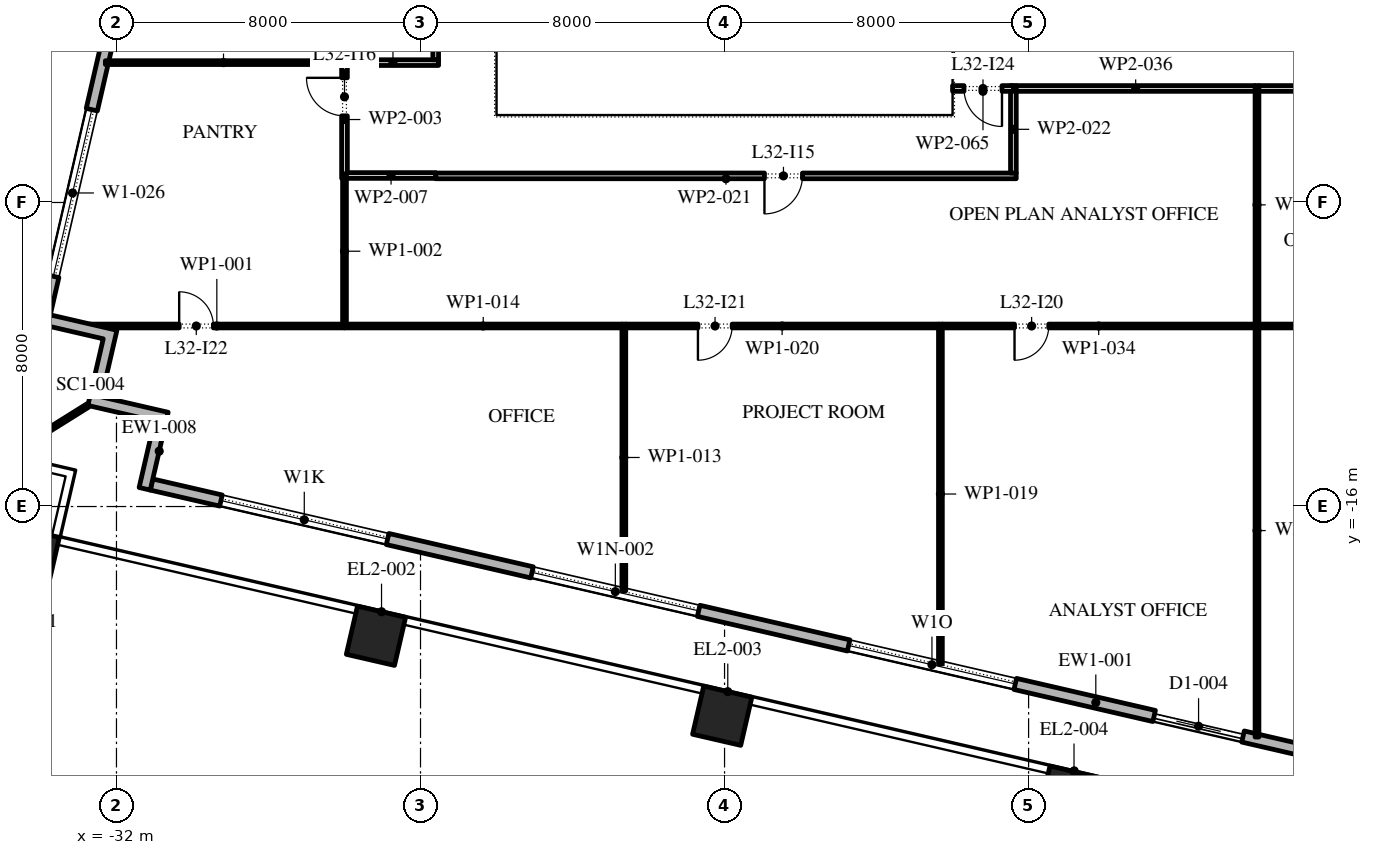
"""IFC4 building model, lengths in metres.
Left out: names, types, materials, properties, quantities, classifications, styles, units other than length and angle.
Written with IfcOpenShell. Run it as: python <this file> out.ifc"""

import sys

from ifc_helpers import new_model, si_unit, direction, frame, frame_2d, origin, origin_2d, place, context, subcontext, project, spatial, polyline, rectangle, outline, extrude, element, fill, save


model = new_model("IFC4")
c1 = context("Model", 3, precision=1e-05, world=origin(), true_north=direction((0.0, 1.0)))
c2 = subcontext(c1, "Body", "Model", "MODEL_VIEW")
j1 = project(units=[si_unit("LENGTHUNIT", "METRE"), si_unit("PLANEANGLEUNIT", "RADIAN")], contexts=[c1])
p1 = place(None, origin())
s1 = spatial("IfcSite", under=j1, at=p1, CompositionType="ELEMENT")
p2 = place(p1, origin())
s2 = spatial("IfcBuilding", under=s1, at=p2, CompositionType="ELEMENT")
p3 = place(p2, frame((0.0, 0.0, 147.6)))
s3 = spatial("IfcBuildingStorey", under=s2, at=p3, CompositionType="ELEMENT", Elevation=147.6)
for number, where, z_axis, x_axis in (
    (1, (-34.282, -17.298, 0.0), (0.0, 0.0, 1.0), (0.974, -0.225, 0.0)),
    (2, (-25.172, -19.402, 0.0), (0.0, 0.0, 1.0), (0.974, -0.225, 0.0)),
    (3, (-16.061, -21.505, 0.0), (0.0, 0.0, 1.0), (0.974, -0.225, 0.0)),
    (4, (-6.951, -23.608, 0.0), (0.0, 0.0, 1.0), (0.974, -0.225, 0.0)),
):
    element("IfcColumn", number, at=place(p3, frame(where, z_axis=z_axis, x_axis=x_axis)), inside=s3, PredefinedType="COLUMN", context=c2, shape_type="SweptSolid", body=[
        extrude(rectangle(XDim=1.3, YDim=1.3, at=origin_2d()), origin(), (0.0, 0.0, 1.0), 4.2),
    ])
p4 = place(p3, frame((-31.078, -15.421, 0.0), z_axis=(0.0, 0.0, 1.0), x_axis=(0.974370456532, -0.224949357493, 0.0)))
e5 = element("IfcWall", 5, at=p4, inside=s3, PredefinedType="STANDARD", context=c2, shape_type="SweptSolid", body=[
    extrude(rectangle(XDim=51.0, YDim=0.3, at=frame_2d((25.5, 0.0))), origin(), (0.0, 0.0, 1.0), 4.0),
])
p5 = place(p4, frame((1.875, 0.0, 0.45)))
e6 = element("IfcOpeningElement", 6, at=p5, cuts=e5, PredefinedType="OPENING", context=c2, shape_type="SweptSolid", body=[
    extrude(rectangle(XDim=4.5, YDim=2.65, at=frame_2d((2.25, 1.325))), frame((0.0, 0.16, 0.0), z_axis=(0.0, -1.0, 0.0), x_axis=(1.0, 0.0, 0.0)), (0.0, 0.0, 1.0), 0.32),
])
p6 = place(p4, frame((10.275, 0.0, 0.45)))
e7 = element("IfcOpeningElement", 7, at=p6, cuts=e5, PredefinedType="OPENING", context=c2, shape_type="SweptSolid", body=[
    extrude(rectangle(XDim=4.5, YDim=2.525, at=frame_2d((2.25, 1.262))), frame((0.0, 0.16, 0.0), z_axis=(0.0, -1.0, 0.0), x_axis=(1.0, 0.0, 0.0)), (0.0, 0.0, 1.0), 0.32),
])
p7 = place(p4, frame((18.825, 0.0, 0.45)))
e8 = element("IfcOpeningElement", 8, at=p7, cuts=e5, PredefinedType="OPENING", context=c2, shape_type="SweptSolid", body=[
    extrude(rectangle(XDim=4.5, YDim=2.5, at=frame_2d((2.25, 1.25))), frame((0.0, 0.16, 0.0), z_axis=(0.0, -1.0, 0.0), x_axis=(1.0, 0.0, 0.0)), (0.0, 0.0, 1.0), 0.32),
])
p8 = place(p4, frame((27.075, 0.0, 0.0)))
e9 = element("IfcOpeningElement", 9, at=p8, cuts=e5, PredefinedType="OPENING", context=c2, shape_type="SweptSolid", body=[
    extrude(rectangle(XDim=2.4, YDim=3.5, at=frame_2d((1.2, 1.75))), frame((0.0, 0.16, 0.0), z_axis=(0.0, -1.0, 0.0), x_axis=(1.0, 0.0, 0.0)), (0.0, 0.0, 1.0), 0.32),
])
p9 = place(p4, frame((35.925, 0.0, 0.45)))
e10 = element("IfcOpeningElement", 10, at=p9, cuts=e5, PredefinedType="OPENING", context=c2, shape_type="SweptSolid", body=[
    extrude(rectangle(XDim=4.5, YDim=2.45, at=frame_2d((2.25, 1.225))), frame((0.0, 0.16, 0.0), z_axis=(0.0, -1.0, 0.0), x_axis=(1.0, 0.0, 0.0)), (0.0, 0.0, 1.0), 0.32),
])
p10 = place(p4, frame((44.475, 0.0, 0.45)))
e11 = element("IfcOpeningElement", 11, at=p10, cuts=e5, PredefinedType="OPENING", context=c2, shape_type="SweptSolid", body=[
    extrude(rectangle(XDim=4.5, YDim=2.45, at=frame_2d((2.25, 1.225))), frame((0.0, 0.16, 0.0), z_axis=(0.0, -1.0, 0.0), x_axis=(1.0, 0.0, 0.0)), (0.0, 0.0, 1.0), 0.32),
])
p11 = place(p3, frame((-22.82, 37.016, 0.0), z_axis=(0.0, 0.0, 1.0), x_axis=(-0.224953880882, -0.974369412223, 0.0)))
e12 = element("IfcWall", 12, at=p11, inside=s3, PredefinedType="STANDARD", context=c2, shape_type="SweptSolid", body=[
    extrude(rectangle(XDim=49.5, YDim=0.3, at=frame_2d((24.75, 0.0))), origin(), (0.0, 0.0, 1.0), 4.0),
])
p12 = place(p11, frame((1.157, 0.0, 0.45)))
e13 = element("IfcOpeningElement", 13, at=p12, cuts=e12, PredefinedType="OPENING", context=c2, shape_type="SweptSolid", body=[
    extrude(rectangle(XDim=4.5, YDim=3.05, at=frame_2d((2.25, 1.525))), frame((0.0, 0.16, 0.0), z_axis=(0.0, -1.0, 0.0), x_axis=(1.0, 0.0, 0.0)), (0.0, 0.0, 1.0), 0.32),
])
p13 = place(p11, frame((8.121, 0.0, 0.45)))
e14 = element("IfcOpeningElement", 14, at=p13, cuts=e12, PredefinedType="OPENING", context=c2, shape_type="SweptSolid", body=[
    extrude(rectangle(XDim=4.5, YDim=3.05, at=frame_2d((2.25, 1.525))), frame((0.0, 0.16, 0.0), z_axis=(0.0, -1.0, 0.0), x_axis=(1.0, 0.0, 0.0)), (0.0, 0.0, 1.0), 0.32),
])
p14 = place(p11, frame((15.236, 0.0, 0.45)))
e15 = element("IfcOpeningElement", 15, at=p14, cuts=e12, PredefinedType="OPENING", context=c2, shape_type="SweptSolid", body=[
    extrude(rectangle(XDim=4.5, YDim=3.05, at=frame_2d((2.25, 1.525))), frame((0.0, 0.16, 0.0), z_axis=(0.0, -1.0, 0.0), x_axis=(1.0, 0.0, 0.0)), (0.0, 0.0, 1.0), 0.32),
])
p15 = place(p11, frame((23.4, 0.0, 0.0)))
e16 = element("IfcOpeningElement", 16, at=p15, cuts=e12, PredefinedType="OPENING", context=c2, shape_type="SweptSolid", body=[
    extrude(rectangle(XDim=2.4, YDim=3.5, at=frame_2d((1.2, 1.75))), frame((0.0, 0.16, 0.0), z_axis=(0.0, -1.0, 0.0), x_axis=(1.0, 0.0, 0.0)), (0.0, 0.0, 1.0), 0.32),
])
p16 = place(p11, frame((29.464, 0.0, 0.45)))
e17 = element("IfcOpeningElement", 17, at=p16, cuts=e12, PredefinedType="OPENING", context=c2, shape_type="SweptSolid", body=[
    extrude(rectangle(XDim=4.5, YDim=2.875, at=frame_2d((2.25, 1.438))), frame((0.0, 0.16, 0.0), z_axis=(0.0, -1.0, 0.0), x_axis=(1.0, 0.0, 0.0)), (0.0, 0.0, 1.0), 0.32),
])
p17 = place(p11, frame((36.579, 0.0, 0.45)))
e18 = element("IfcOpeningElement", 18, at=p17, cuts=e12, PredefinedType="OPENING", context=c2, shape_type="SweptSolid", body=[
    extrude(rectangle(XDim=4.5, YDim=2.675, at=frame_2d((2.25, 1.337))), frame((0.0, 0.16, 0.0), z_axis=(0.0, -1.0, 0.0), x_axis=(1.0, 0.0, 0.0)), (0.0, 0.0, 1.0), 0.32),
])
p18 = place(p11, frame((43.693, 0.0, 0.45)))
e19 = element("IfcOpeningElement", 19, at=p18, cuts=e12, PredefinedType="OPENING", context=c2, shape_type="SweptSolid", body=[
    extrude(rectangle(XDim=4.5, YDim=3.05, at=frame_2d((2.25, 1.525))), frame((0.0, 0.16, 0.0), z_axis=(0.0, -1.0, 0.0), x_axis=(1.0, 0.0, 0.0)), (0.0, 0.0, 1.0), 0.32),
])
p19 = place(p3, origin())
e20 = element("IfcWall", 20, at=p19, inside=s3, PredefinedType="STANDARD", context=c2, shape_type="SweptSolid", body=[
    extrude(outline(polyline([(-32.393, -13.116), (-30.639, -13.521), (-31.111, -15.567), (-31.404, -15.5), (-30.999, -13.746), (-32.753, -13.341), (-32.348, -11.587), (-33.809, -11.25), (-33.742, -10.957), (-31.988, -11.362), (-32.393, -13.116)])), origin(), (0.0, 0.0, 1.0), 4.0),
])
p20 = place(p3, frame((-32.753, -13.341, -0.05), z_axis=(0.0, 0.0, 1.0), x_axis=(-0.848059759764, -0.529900598103, 0.0)))
e21 = element("IfcWall", 21, at=p20, inside=s3, PredefinedType="STANDARD", context=c2, shape_type="SweptSolid", body=[
    extrude(rectangle(XDim=2.455, YDim=0.1, at=frame_2d((1.228, 0.0))), origin(), (0.0, 0.0, 1.0), 4.05),
])
p21 = place(p3, frame((-26.0, -11.25, 0.0), z_axis=(0.0, 0.0, 1.0), x_axis=(-1.0, 0.0, 0.0)))
e22 = element("IfcWall", 22, at=p21, inside=s3, PredefinedType="PARTITIONING", context=c2, shape_type="SweptSolid", body=[
    extrude(rectangle(XDim=6.718, YDim=0.1, at=frame_2d((3.359, 0.0))), origin(), (0.0, 0.0, 1.0), 4.0),
])
p22 = place(p21, frame((3.45, 0.0, 0.0)))
e23 = element("IfcOpeningElement", 23, at=p22, cuts=e22, PredefinedType="OPENING", context=c2, shape_type="SweptSolid", body=[
    extrude(rectangle(XDim=0.9, YDim=2.1, at=frame_2d((0.45, 1.05))), frame((0.0, 0.06, 0.0), z_axis=(0.0, -1.0, 0.0), x_axis=(1.0, 0.0, 0.0)), (0.0, 0.0, 1.0), 0.12),
])
p23 = place(p3, frame((-26.0, -11.2, 0.0), z_axis=(0.0, 0.0, 1.0), x_axis=(0.0, 1.0, 0.0)))
e24 = element("IfcWall", 24, at=p23, inside=s3, PredefinedType="PARTITIONING", context=c2, shape_type="SweptSolid", body=[
    extrude(rectangle(XDim=3.835, YDim=0.1, at=frame_2d((1.917, 0.0))), origin(), (0.0, 0.0, 1.0), 4.0),
])
p24 = place(p3, frame((-26.0, -7.365, 0.0), z_axis=(0.0, 0.0, 1.0), x_axis=(0.0, 1.0, 0.0)))
e25 = element("IfcWall", 25, at=p24, inside=s3, PredefinedType="PARTITIONING", context=c2, shape_type="SweptSolid", body=[
    extrude(rectangle(XDim=3.095, YDim=0.15, at=frame_2d((1.547, 0.0))), origin(), (0.0, 0.0, 1.0), 4.0),
])
p25 = place(p24, frame((1.645, 0.0, 0.0)))
e26 = element("IfcOpeningElement", 26, at=p25, cuts=e25, PredefinedType="OPENING", context=c2, shape_type="SweptSolid", body=[
    extrude(rectangle(XDim=1.0, YDim=2.1, at=frame_2d((0.5, 1.05))), frame((0.0, 0.085, 0.0), z_axis=(0.0, -1.0, 0.0), x_axis=(1.0, 0.0, 0.0)), (0.0, 0.0, 1.0), 0.17),
])
p26 = place(p3, frame((-26.075, -4.32, 0.0), z_axis=(0.0, 0.0, 1.0), x_axis=(-1.0, 0.0, 0.0)))
e27 = element("IfcWall", 27, at=p26, inside=s3, PredefinedType="PARTITIONING", context=c2, shape_type="SweptSolid", body=[
    extrude(rectangle(XDim=6.217, YDim=0.1, at=frame_2d((3.108, 0.0))), origin(), (0.0, 0.0, 1.0), 4.0),
])
p27 = place(p3, frame((-25.925, -4.32, 0.0), z_axis=(0.0, 0.0, 1.0), x_axis=(1.0, 0.0, 0.0)))
e28 = element("IfcWall", 28, at=p27, inside=s3, PredefinedType="PARTITIONING", context=c2, shape_type="SweptSolid", body=[
    extrude(rectangle(XDim=2.4, YDim=0.15, at=frame_2d((1.2, 0.0))), origin(), (0.0, 0.0, 1.0), 4.0),
])
p28 = place(p3, frame((-23.6, -7.29, 0.0), z_axis=(0.0, 0.0, 1.0), x_axis=(-1.0, 0.0, 0.0)))
e29 = element("IfcWall", 29, at=p28, inside=s3, PredefinedType="PARTITIONING", context=c2, shape_type="SweptSolid", body=[
    extrude(rectangle(XDim=2.35, YDim=0.15, at=frame_2d((1.175, 0.0))), origin(), (0.0, 0.0, 1.0), 4.0),
])
p29 = place(p3, frame((-23.6, -4.245, 0.0), z_axis=(0.0, 0.0, 1.0), x_axis=(0.0, 1.0, 0.0)))
e30 = element("IfcWall", 30, at=p29, inside=s3, PredefinedType="PARTITIONING", context=c2, shape_type="SweptSolid", body=[
    extrude(rectangle(XDim=14.685, YDim=0.15, at=frame_2d((7.343, 0.0))), origin(), (0.0, 0.0, 1.0), 4.0),
])
p30 = place(p29, frame((3.735, 0.0, 0.0)))
e31 = element("IfcOpeningElement", 31, at=p30, cuts=e30, PredefinedType="OPENING", context=c2, shape_type="SweptSolid", body=[
    extrude(rectangle(XDim=1.0, YDim=2.1, at=frame_2d((0.5, 1.05))), frame((0.0, 0.085, 0.0), z_axis=(0.0, -1.0, 0.0), x_axis=(1.0, 0.0, 0.0)), (0.0, 0.0, 1.0), 0.17),
])
p31 = place(p3, frame((-18.65, -18.219, 0.0), z_axis=(0.0, 0.0, 1.0), x_axis=(0.0, 1.0, 0.0)))
e32 = element("IfcWall", 32, at=p31, inside=s3, PredefinedType="PARTITIONING", context=c2, shape_type="SweptSolid", body=[
    extrude(rectangle(XDim=7.019, YDim=0.1, at=frame_2d((3.51, 0.0))), origin(), (0.0, 0.0, 1.0), 4.0),
])
p32 = place(p3, frame((-18.7, -11.25, 0.0), z_axis=(0.0, 0.0, 1.0), x_axis=(-1.0, 0.0, 0.0)))
e33 = element("IfcWall", 33, at=p32, inside=s3, PredefinedType="PARTITIONING", context=c2, shape_type="SweptSolid", body=[
    extrude(rectangle(XDim=7.3, YDim=0.1, at=frame_2d((3.65, 0.0))), origin(), (0.0, 0.0, 1.0), 4.0),
])
p33 = place(p3, frame((-10.32, -20.142, 0.0), z_axis=(0.0, 0.0, 1.0), x_axis=(0.0, 1.0, 0.0)))
e34 = element("IfcWall", 34, at=p33, inside=s3, PredefinedType="PARTITIONING", context=c2, shape_type="SweptSolid", body=[
    extrude(rectangle(XDim=8.942, YDim=0.1, at=frame_2d((4.471, 0.0))), origin(), (0.0, 0.0, 1.0), 4.0),
])
p34 = place(p3, frame((-10.37, -11.25, 0.0), z_axis=(0.0, 0.0, 1.0), x_axis=(-1.0, 0.0, 0.0)))
e35 = element("IfcWall", 35, at=p34, inside=s3, PredefinedType="PARTITIONING", context=c2, shape_type="SweptSolid", body=[
    extrude(rectangle(XDim=8.23, YDim=0.1, at=frame_2d((4.115, 0.0))), origin(), (0.0, 0.0, 1.0), 4.0),
])
p35 = place(p34, frame((5.43, 0.0, 0.0)))
e36 = element("IfcOpeningElement", 36, at=p35, cuts=e35, PredefinedType="OPENING", context=c2, shape_type="SweptSolid", body=[
    extrude(rectangle(XDim=0.9, YDim=2.1, at=frame_2d((0.45, 1.05))), frame((0.0, 0.06, 0.0), z_axis=(0.0, -1.0, 0.0), x_axis=(1.0, 0.0, 0.0)), (0.0, 0.0, 1.0), 0.12),
])
p36 = place(p3, frame((-8.325, -7.3, 0.0), z_axis=(0.0, 0.0, 1.0), x_axis=(-1.0, 0.0, 0.0)))
e37 = element("IfcWall", 37, at=p36, inside=s3, PredefinedType="PARTITIONING", context=c2, shape_type="SweptSolid", body=[
    extrude(rectangle(XDim=15.275, YDim=0.15, at=frame_2d((7.638, 0.0))), origin(), (0.0, 0.0, 1.0), 4.0),
])
p37 = place(p36, frame((5.625, 0.0, 0.0)))
e38 = element("IfcOpeningElement", 38, at=p37, cuts=e37, PredefinedType="OPENING", context=c2, shape_type="SweptSolid", body=[
    extrude(rectangle(XDim=1.0, YDim=2.1, at=frame_2d((0.5, 1.05))), frame((0.0, 0.085, 0.0), z_axis=(0.0, -1.0, 0.0), x_axis=(1.0, 0.0, 0.0)), (0.0, 0.0, 1.0), 0.17),
])
p38 = place(p3, frame((-8.4, -4.925, 0.0), z_axis=(0.0, 0.0, 1.0), x_axis=(0.0, -1.0, 0.0)))
e39 = element("IfcWall", 39, at=p38, inside=s3, PredefinedType="PARTITIONING", context=c2, shape_type="SweptSolid", body=[
    extrude(rectangle(XDim=2.3, YDim=0.15, at=frame_2d((1.15, 0.0))), origin(), (0.0, 0.0, 1.0), 4.0),
])
p39 = place(p3, frame((-1.99, -22.065, 0.0), z_axis=(0.0, 0.0, 1.0), x_axis=(0.0, 1.0, 0.0)))
e40 = element("IfcWall", 40, at=p39, inside=s3, PredefinedType="PARTITIONING", context=c2, shape_type="SweptSolid", body=[
    extrude(rectangle(XDim=10.865, YDim=0.1, at=frame_2d((5.433, 0.0))), origin(), (0.0, 0.0, 1.0), 3.02),
])
p40 = place(p3, frame((-2.04, -11.25, 0.0), z_axis=(0.0, 0.0, 1.0), x_axis=(-1.0, 0.0, 0.0)))
e41 = element("IfcWall", 41, at=p40, inside=s3, PredefinedType="PARTITIONING", context=c2, shape_type="SweptSolid", body=[
    extrude(rectangle(XDim=8.23, YDim=0.1, at=frame_2d((4.115, 0.0))), origin(), (0.0, 0.0, 1.0), 4.0),
])
p41 = place(p40, frame((5.43, 0.0, 0.0)))
e42 = element("IfcOpeningElement", 42, at=p41, cuts=e41, PredefinedType="OPENING", context=c2, shape_type="SweptSolid", body=[
    extrude(rectangle(XDim=0.9, YDim=2.1, at=frame_2d((0.45, 1.05))), frame((0.0, 0.06, 0.0), z_axis=(0.0, -1.0, 0.0), x_axis=(1.0, 0.0, 0.0)), (0.0, 0.0, 1.0), 0.12),
])
p42 = place(p3, frame((-1.99, -11.2, 0.0), z_axis=(0.0, 0.0, 1.0), x_axis=(0.0, 1.0, 0.0)))
e43 = element("IfcWall", 43, at=p42, inside=s3, PredefinedType="PARTITIONING", context=c2, shape_type="SweptSolid", body=[
    extrude(rectangle(XDim=6.275, YDim=0.1, at=frame_2d((3.137, 0.0))), origin(), (0.0, 0.0, 1.0), 3.02),
])
p43 = place(p3, frame((-2.04, -5.0, 0.0), z_axis=(0.0, 0.0, 1.0), x_axis=(-1.0, 0.0, 0.0)))
e44 = element("IfcWall", 44, at=p43, inside=s3, PredefinedType="PARTITIONING", context=c2, shape_type="SweptSolid", body=[
    extrude(rectangle(XDim=6.285, YDim=0.15, at=frame_2d((3.143, 0.0))), origin(), (0.0, 0.0, 1.0), 4.0),
])
p44 = place(p3, frame((8.325, -5.0, 0.0), z_axis=(0.0, 0.0, 1.0), x_axis=(-1.0, 0.0, 0.0)))
e45 = element("IfcWall", 45, at=p44, inside=s3, PredefinedType="PARTITIONING", context=c2, shape_type="SweptSolid", body=[
    extrude(rectangle(XDim=10.265, YDim=0.15, at=frame_2d((5.132, 0.0))), origin(), (0.0, 0.0, 1.0), 4.0),
])
p45 = place(p44, frame((4.665, 0.0, 0.0)))
e46 = element("IfcOpeningElement", 46, at=p45, cuts=e45, PredefinedType="OPENING", context=c2, shape_type="SweptSolid", body=[
    extrude(rectangle(XDim=1.0, YDim=2.1, at=frame_2d((0.5, 1.05))), frame((0.0, 0.085, 0.0), z_axis=(0.0, -1.0, 0.0), x_axis=(1.0, 0.0, 0.0)), (0.0, 0.0, 1.0), 0.17),
])
p46 = place(p3, frame((10.05, -11.25, 0.0), z_axis=(0.0, 0.0, 1.0), x_axis=(-1.0, 0.0, 0.0)))
e47 = element("IfcWall", 47, at=p46, inside=s3, PredefinedType="PARTITIONING", context=c2, shape_type="SweptSolid", body=[
    extrude(rectangle(XDim=11.99, YDim=0.1, at=frame_2d((5.995, 0.0))), origin(), (0.0, 0.0, 1.0), 4.0),
])
p47 = place(p46, frame((4.44, 0.0, 0.0)))
e48 = element("IfcOpeningElement", 48, at=p47, cuts=e47, PredefinedType="OPENING", context=c2, shape_type="SweptSolid", body=[
    extrude(rectangle(XDim=0.9, YDim=2.1, at=frame_2d((0.45, 1.05))), frame((0.0, 0.06, 0.0), z_axis=(0.0, -1.0, 0.0), x_axis=(1.0, 0.0, 0.0)), (0.0, 0.0, 1.0), 0.12),
])
p48 = place(p3, frame((-8.4, -5.0, 0.0), z_axis=(0.0, 0.0, 1.0), x_axis=(-1.0, 0.0, 0.0)))
e49 = element("IfcWall", 49, at=p48, inside=s3, PredefinedType="PARTITIONING", context=c2, shape_type="SweptSolid", body=[
    extrude(rectangle(XDim=1.6, YDim=0.15, at=frame_2d((0.8, 0.0))), origin(), (0.0, 0.0, 1.0), 4.0),
])
p49 = place(p48, frame((0.3, 0.0, 0.0)))
e50 = element("IfcOpeningElement", 50, at=p49, cuts=e49, PredefinedType="OPENING", context=c2, shape_type="SweptSolid", body=[
    extrude(rectangle(XDim=1.0, YDim=2.1, at=frame_2d((0.5, 1.05))), frame((0.0, 0.085, 0.0), z_axis=(0.0, -1.0, 0.0), x_axis=(1.0, 0.0, 0.0)), (0.0, 0.0, 1.0), 0.17),
])
p50 = place(p5, origin())
e51 = element("IfcWindow", 51, at=p50, inside=s3, PartitioningType="DOUBLE_PANEL_VERTICAL", PredefinedType="WINDOW", context=c2, shape_type="SweptSolid", body=[
    extrude(rectangle(XDim=4.5, YDim=2.65, at=frame_2d((2.25, 1.325))), frame((0.0, 0.03, 0.0), z_axis=(0.0, -1.0, 0.0), x_axis=(1.0, 0.0, 0.0)), (0.0, 0.0, 1.0), 0.06),
])
fill(e6, e51)
p51 = place(p6, origin())
e52 = element("IfcWindow", 52, at=p51, inside=s3, PartitioningType="DOUBLE_PANEL_VERTICAL", PredefinedType="WINDOW", context=c2, shape_type="SweptSolid", body=[
    extrude(rectangle(XDim=4.5, YDim=2.525, at=frame_2d((2.25, 1.262))), frame((0.0, 0.03, 0.0), z_axis=(0.0, -1.0, 0.0), x_axis=(1.0, 0.0, 0.0)), (0.0, 0.0, 1.0), 0.06),
])
fill(e7, e52)
p52 = place(p7, origin())
e53 = element("IfcWindow", 53, at=p52, inside=s3, PartitioningType="DOUBLE_PANEL_VERTICAL", PredefinedType="WINDOW", context=c2, shape_type="SweptSolid", body=[
    extrude(rectangle(XDim=4.5, YDim=2.5, at=frame_2d((2.25, 1.25))), frame((0.0, 0.03, 0.0), z_axis=(0.0, -1.0, 0.0), x_axis=(1.0, 0.0, 0.0)), (0.0, 0.0, 1.0), 0.06),
])
fill(e8, e53)
p53 = place(p8, origin())
e54 = element("IfcDoor", 54, at=p53, inside=s3, OperationType="DOUBLE_DOOR_SLIDING", PredefinedType="DOOR", context=c2, shape_type="SweptSolid", body=[
    extrude(rectangle(XDim=2.4, YDim=3.5, at=frame_2d((1.2, 1.75))), frame((0.0, 0.025, 0.0), z_axis=(0.0, -1.0, 0.0), x_axis=(1.0, 0.0, 0.0)), (0.0, 0.0, 1.0), 0.05),
])
fill(e9, e54)
p54 = place(p18, origin())
e55 = element("IfcWindow", 55, at=p54, inside=s3, PartitioningType="DOUBLE_PANEL_VERTICAL", PredefinedType="WINDOW", context=c2, shape_type="SweptSolid", body=[
    extrude(rectangle(XDim=4.5, YDim=3.05, at=frame_2d((2.25, 1.525))), frame((0.0, 0.03, 0.0), z_axis=(0.0, -1.0, 0.0), x_axis=(1.0, 0.0, 0.0)), (0.0, 0.0, 1.0), 0.06),
])
fill(e19, e55)
p55 = place(p37, origin())
e56 = element("IfcDoor", 56, at=p55, inside=s3, OperationType="SINGLE_SWING_LEFT", PredefinedType="DOOR", context=c2, shape_type="SweptSolid", body=[
    extrude(rectangle(XDim=1.0, YDim=2.1, at=frame_2d((0.5, 1.05))), frame((0.0, 0.025, 0.0), z_axis=(0.0, -1.0, 0.0), x_axis=(1.0, 0.0, 0.0)), (0.0, 0.0, 1.0), 0.05),
])
fill(e38, e56)
p56 = place(p25, origin())
e57 = element("IfcDoor", 57, at=p56, inside=s3, OperationType="SINGLE_SWING_LEFT", PredefinedType="DOOR", context=c2, shape_type="SweptSolid", body=[
    extrude(rectangle(XDim=1.0, YDim=2.1, at=frame_2d((0.5, 1.05))), frame((0.0, 0.025, 0.0), z_axis=(0.0, -1.0, 0.0), x_axis=(1.0, 0.0, 0.0)), (0.0, 0.0, 1.0), 0.05),
])
fill(e26, e57)
p57 = place(p41, origin())
e58 = element("IfcDoor", 58, at=p57, inside=s3, OperationType="SINGLE_SWING_LEFT", PredefinedType="DOOR", context=c2, shape_type="SweptSolid", body=[
    extrude(rectangle(XDim=0.9, YDim=2.1, at=frame_2d((0.45, 1.05))), frame((0.0, 0.025, 0.0), z_axis=(0.0, -1.0, 0.0), x_axis=(1.0, 0.0, 0.0)), (0.0, 0.0, 1.0), 0.05),
])
fill(e42, e58)
p58 = place(p35, origin())
e59 = element("IfcDoor", 59, at=p58, inside=s3, OperationType="SINGLE_SWING_LEFT", PredefinedType="DOOR", context=c2, shape_type="SweptSolid", body=[
    extrude(rectangle(XDim=0.9, YDim=2.1, at=frame_2d((0.45, 1.05))), frame((0.0, 0.025, 0.0), z_axis=(0.0, -1.0, 0.0), x_axis=(1.0, 0.0, 0.0)), (0.0, 0.0, 1.0), 0.05),
])
fill(e36, e59)
p59 = place(p22, frame((0.9, 0.0, 0.0), z_axis=(0.0, 0.0, 1.0), x_axis=(-1.0, 0.0, 0.0)))
e60 = element("IfcDoor", 60, at=p59, inside=s3, OperationType="SINGLE_SWING_RIGHT", PredefinedType="DOOR", context=c2, shape_type="SweptSolid", body=[
    extrude(rectangle(XDim=0.9, YDim=2.1, at=frame_2d((0.45, 1.05))), frame((0.0, 0.025, 0.0), z_axis=(0.0, -1.0, 0.0), x_axis=(1.0, 0.0, 0.0)), (0.0, 0.0, 1.0), 0.05),
])
fill(e23, e60)
p60 = place(p49, origin())
e61 = element("IfcDoor", 61, at=p60, inside=s3, OperationType="SINGLE_SWING_RIGHT", PredefinedType="DOOR", context=c2, shape_type="SweptSolid", body=[
    extrude(rectangle(XDim=1.0, YDim=2.1, at=frame_2d((0.5, 1.05))), frame((0.0, 0.025, 0.0), z_axis=(0.0, -1.0, 0.0), x_axis=(1.0, 0.0, 0.0)), (0.0, 0.0, 1.0), 0.05),
])
fill(e50, e61)
save(model, sys.argv[1])
